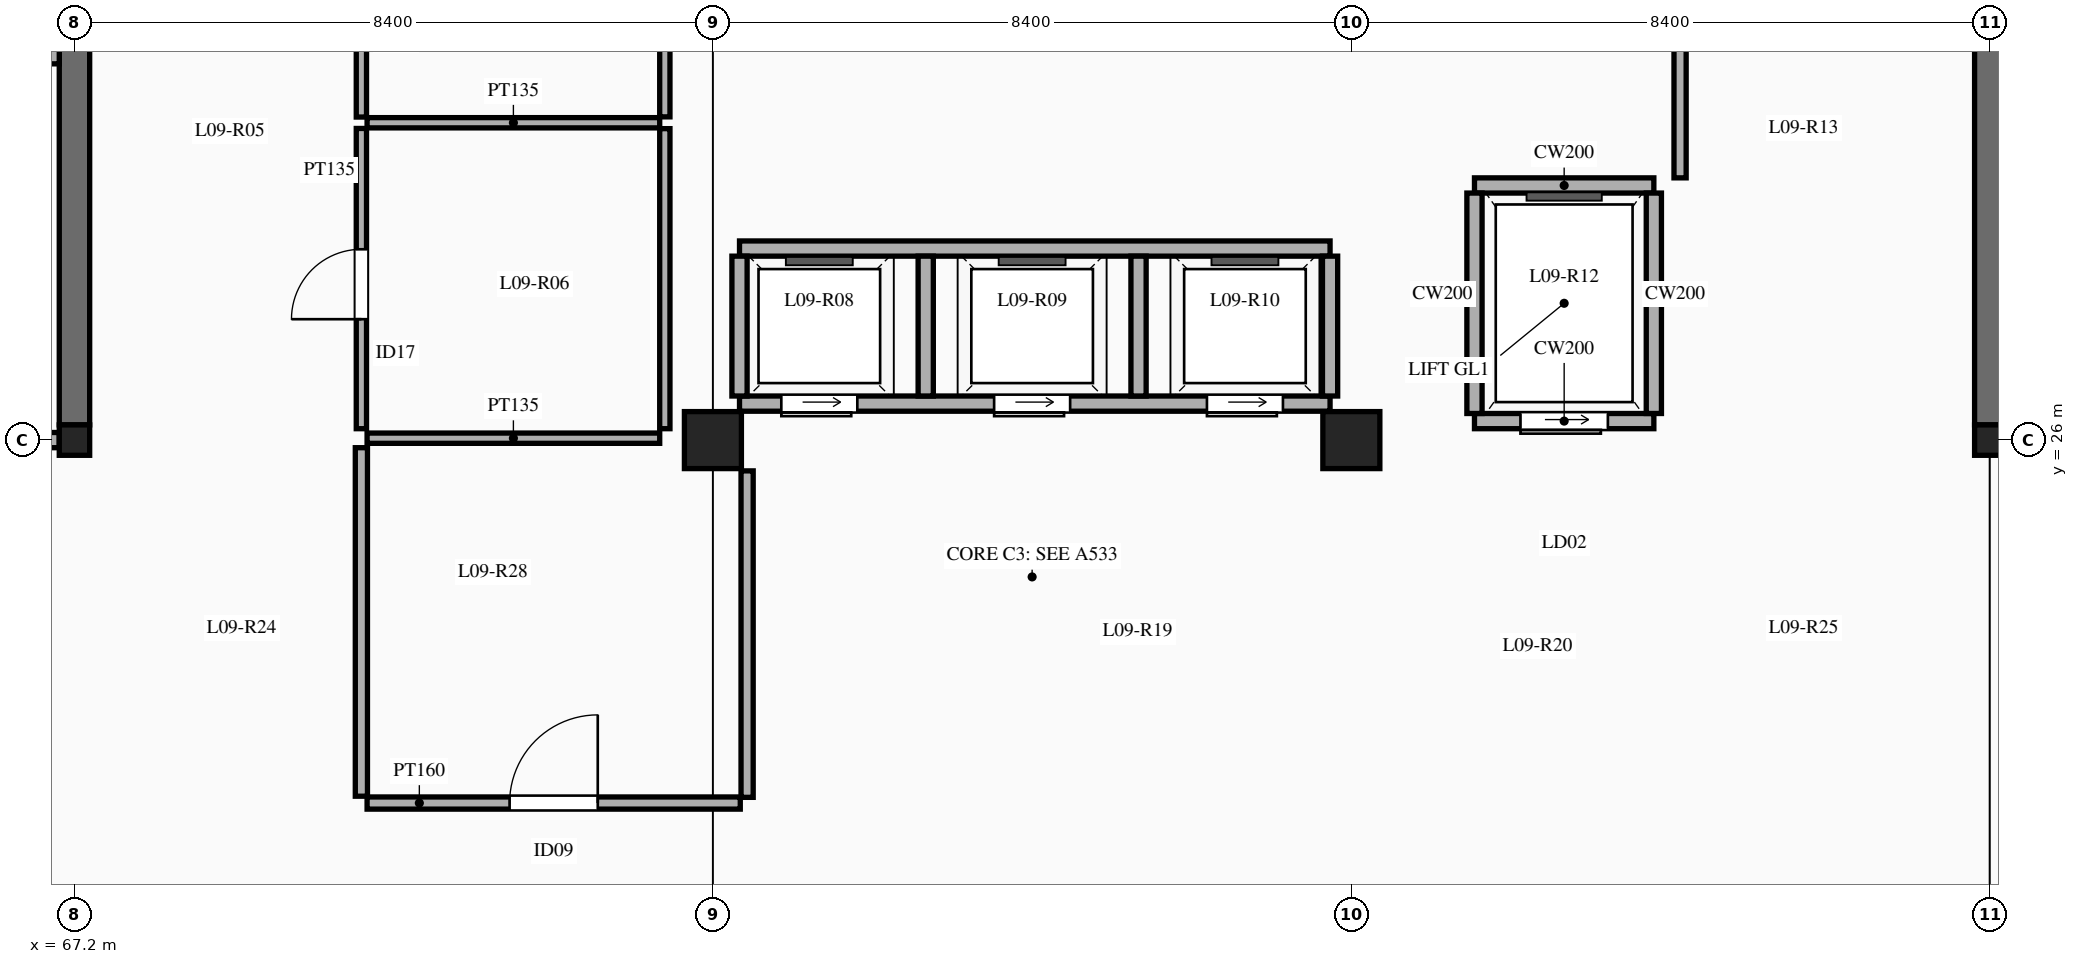
"""IFC4 building model, lengths in metres.
Left out: names, types, materials, properties, quantities, classifications, styles, units other than length and angle.
Written with IfcOpenShell. Run it as: python <this file> out.ifc"""

import sys

from ifc_helpers import new_model, si_unit, direction, frame, frame_2d, origin, origin_2d, place, context, subcontext, project, spatial, rectangle, extrude, element, fill, save


model = new_model("IFC4")
c1 = context("Model", 3, precision=1e-05, world=origin(), true_north=direction((0.0, 1.0)))
c2 = subcontext(c1, "Body", "Model", "MODEL_VIEW")
j1 = project(units=[si_unit("LENGTHUNIT", "METRE"), si_unit("PLANEANGLEUNIT", "RADIAN")], contexts=[c1])
p1 = place(None, origin())
s1 = spatial("IfcSite", under=j1, at=p1, CompositionType="ELEMENT")
p2 = place(p1, origin())
s2 = spatial("IfcBuilding", under=s1, at=p2, CompositionType="ELEMENT")
p3 = place(p2, frame((0.0, 0.0, 42.0)))
s3 = spatial("IfcBuildingStorey", under=s2, at=p3, CompositionType="ELEMENT", Elevation=42.0)
p4 = place(p3, frame((67.2, 26.0, 0.0), z_axis=(0.0, 0.0, 1.0), x_axis=(1.0, 0.0, 0.0)))
e1 = element("IfcColumn", 1, at=p4, inside=s3, PredefinedType="COLUMN", context=c2, shape_type="SweptSolid", body=[
    extrude(rectangle(XDim=0.4, YDim=0.4, at=origin_2d()), origin(), (0.0, 0.0, 1.0), 4.5),
])
for number, where, z_axis, x_axis in (
    (2, (75.6, 26.0, 0.0), (0.0, 0.0, 1.0), (1.0, 0.0, 0.0)),
    (3, (84.0, 26.0, 0.0), (0.0, 0.0, 1.0), (1.0, 0.0, 0.0)),
):
    element("IfcColumn", number, at=place(p3, frame(where, z_axis=z_axis, x_axis=x_axis)), inside=s3, PredefinedType="COLUMN", context=c2, shape_type="SweptSolid", body=[
        extrude(rectangle(XDim=0.75, YDim=0.75, at=origin_2d()), origin(), (0.0, 0.0, 1.0), 4.5),
    ])
p5 = place(p3, frame((92.4, 26.0, 0.0), z_axis=(0.0, 0.0, 1.0), x_axis=(1.0, 0.0, 0.0)))
e4 = element("IfcColumn", 4, at=p5, inside=s3, PredefinedType="COLUMN", context=c2, shape_type="SweptSolid", body=[
    extrude(rectangle(XDim=0.4, YDim=0.4, at=origin_2d()), origin(), (0.0, 0.0, 1.0), 4.5),
])
for number, where, z_axis, x_axis in (
    (5, (67.2, 26.2, 0.0), (0.0, 0.0, 1.0), (0.0, 1.0, 0.0)),
    (6, (92.4, 26.2, 0.0), (0.0, 0.0, 1.0), (0.0, 1.0, 0.0)),
):
    element("IfcWall", number, at=place(p3, frame(where, z_axis=z_axis, x_axis=x_axis)), inside=s3, PredefinedType="SHEAR", context=c2, shape_type="SweptSolid", body=[
        extrude(rectangle(XDim=8.0, YDim=0.4, at=frame_2d((4.0, 0.0))), origin(), (0.0, 0.0, 1.0), 4.5),
    ])
p6 = place(p3, frame((59.0, 26.0, 0.0), z_axis=(0.0, 0.0, 1.0), x_axis=(1.0, 0.0, 0.0)))
e7 = element("IfcWall", 7, at=p6, inside=s3, PredefinedType="SOLIDWALL", context=c2, shape_type="SweptSolid", body=[
    extrude(rectangle(XDim=8.0, YDim=0.2, at=frame_2d((4.0, 0.0))), origin(), (0.0, 0.0, 1.0), 3.78),
])
p7 = place(p6, frame((1.55, 0.0, 0.0)))
e8 = element("IfcOpeningElement", 8, at=p7, cuts=e7, PredefinedType="OPENING", context=c2, shape_type="SweptSolid", body=[
    extrude(rectangle(XDim=1.15, YDim=2.15, at=frame_2d((0.575, 1.075))), frame((0.0, 0.11, 0.0), z_axis=(0.0, -1.0, 0.0), x_axis=(1.0, 0.0, 0.0)), (0.0, 0.0, 1.0), 0.22),
])
p8 = place(p6, frame((5.35, 0.0, 0.0)))
e9 = element("IfcOpeningElement", 9, at=p8, cuts=e7, PredefinedType="OPENING", context=c2, shape_type="SweptSolid", body=[
    extrude(rectangle(XDim=1.22, YDim=2.15, at=frame_2d((0.61, 1.075))), frame((0.0, 0.11, 0.0), z_axis=(0.0, -1.0, 0.0), x_axis=(1.0, 0.0, 0.0)), (0.0, 0.0, 1.0), 0.22),
])
p9 = place(p3, frame((63.05, 31.05, 0.0), z_axis=(0.0, 0.0, 1.0), x_axis=(1.0, 0.0, 0.0)))
e10 = element("IfcWall", 10, at=p9, inside=s3, PredefinedType="SOLIDWALL", context=c2, shape_type="SweptSolid", body=[
    extrude(rectangle(XDim=3.95, YDim=0.2, at=frame_2d((1.975, 0.0))), origin(), (0.0, 0.0, 1.0), 4.3),
])
p10 = place(p9, frame((1.4, 0.0, 0.0)))
e11 = element("IfcOpeningElement", 11, at=p10, cuts=e10, PredefinedType="OPENING", context=c2, shape_type="SweptSolid", body=[
    extrude(rectangle(XDim=1.1, YDim=2.15, at=frame_2d((0.55, 1.075))), frame((0.0, 0.11, 0.0), z_axis=(0.0, -1.0, 0.0), x_axis=(1.0, 0.0, 0.0)), (0.0, 0.0, 1.0), 0.22),
])
p11 = place(p3, frame((75.95, 26.48, 0.0), z_axis=(0.0, 0.0, 1.0), x_axis=(1.0, 0.0, 0.0)))
e12 = element("IfcWall", 12, at=p11, inside=s3, PredefinedType="SOLIDWALL", context=c2, shape_type="SweptSolid", body=[
    extrude(rectangle(XDim=7.77, YDim=0.2, at=frame_2d((3.885, 0.0))), origin(), (0.0, 0.0, 1.0), 4.3),
])
p12 = place(p11, frame((0.55, 0.0, 0.0)))
e13 = element("IfcOpeningElement", 13, at=p12, cuts=e12, PredefinedType="OPENING", context=c2, shape_type="SweptSolid", body=[
    extrude(rectangle(XDim=1.0, YDim=2.15, at=frame_2d((0.5, 1.075))), frame((0.0, 0.11, 0.0), z_axis=(0.0, -1.0, 0.0), x_axis=(1.0, 0.0, 0.0)), (0.0, 0.0, 1.0), 0.22),
])
p13 = place(p11, frame((3.35, 0.0, 0.0)))
e14 = element("IfcOpeningElement", 14, at=p13, cuts=e12, PredefinedType="OPENING", context=c2, shape_type="SweptSolid", body=[
    extrude(rectangle(XDim=1.0, YDim=2.15, at=frame_2d((0.5, 1.075))), frame((0.0, 0.11, 0.0), z_axis=(0.0, -1.0, 0.0), x_axis=(1.0, 0.0, 0.0)), (0.0, 0.0, 1.0), 0.22),
])
p14 = place(p11, frame((6.15, 0.0, 0.0)))
e15 = element("IfcOpeningElement", 15, at=p14, cuts=e12, PredefinedType="OPENING", context=c2, shape_type="SweptSolid", body=[
    extrude(rectangle(XDim=1.0, YDim=2.15, at=frame_2d((0.5, 1.075))), frame((0.0, 0.11, 0.0), z_axis=(0.0, -1.0, 0.0), x_axis=(1.0, 0.0, 0.0)), (0.0, 0.0, 1.0), 0.22),
])
p15 = place(p3, frame((75.95, 28.52, 0.0), z_axis=(0.0, 0.0, 1.0), x_axis=(1.0, 0.0, 0.0)))
e16 = element("IfcWall", 16, at=p15, inside=s3, PredefinedType="SOLIDWALL", context=c2, shape_type="SweptSolid", body=[
    extrude(rectangle(XDim=7.77, YDim=0.2, at=frame_2d((3.885, 0.0))), origin(), (0.0, 0.0, 1.0), 4.3),
])
p16 = place(p3, frame((75.95, 26.58, 0.0), z_axis=(0.0, 0.0, 1.0), x_axis=(0.0, 1.0, 0.0)))
e17 = element("IfcWall", 17, at=p16, inside=s3, PredefinedType="SOLIDWALL", context=c2, shape_type="SweptSolid", body=[
    extrude(rectangle(XDim=1.84, YDim=0.2, at=frame_2d((0.92, 0.0))), origin(), (0.0, 0.0, 1.0), 3.83),
])
for number, where, z_axis, x_axis in (
    (18, (78.4, 26.58, 0.0), (0.0, 0.0, 1.0), (0.0, 1.0, 0.0)),
    (19, (81.2, 26.58, 0.0), (0.0, 0.0, 1.0), (0.0, 1.0, 0.0)),
):
    element("IfcWall", number, at=place(p3, frame(where, z_axis=z_axis, x_axis=x_axis)), inside=s3, PredefinedType="SOLIDWALL", context=c2, shape_type="SweptSolid", body=[
        extrude(rectangle(XDim=1.84, YDim=0.2, at=frame_2d((0.92, 0.0))), origin(), (0.0, 0.0, 1.0), 4.3),
    ])
p17 = place(p3, frame((83.72, 26.58, 0.0), z_axis=(0.0, 0.0, 1.0), x_axis=(0.0, 1.0, 0.0)))
e20 = element("IfcWall", 20, at=p17, inside=s3, PredefinedType="SOLIDWALL", context=c2, shape_type="SweptSolid", body=[
    extrude(rectangle(XDim=1.84, YDim=0.2, at=frame_2d((0.92, 0.0))), origin(), (0.0, 0.0, 1.0), 3.83),
])
p18 = place(p3, frame((85.62, 26.25, 0.0), z_axis=(0.0, 0.0, 1.0), x_axis=(1.0, 0.0, 0.0)))
e21 = element("IfcWall", 21, at=p18, inside=s3, PredefinedType="SOLIDWALL", context=c2, shape_type="SweptSolid", body=[
    extrude(rectangle(XDim=2.36, YDim=0.2, at=frame_2d((1.18, 0.0))), origin(), (0.0, 0.0, 1.0), 3.78),
])
p19 = place(p18, frame((0.605, 0.0, 0.0)))
e22 = element("IfcOpeningElement", 22, at=p19, cuts=e21, PredefinedType="OPENING", context=c2, shape_type="SweptSolid", body=[
    extrude(rectangle(XDim=1.15, YDim=2.2, at=frame_2d((0.575, 1.1))), frame((0.0, 0.11, 0.0), z_axis=(0.0, -1.0, 0.0), x_axis=(1.0, 0.0, 0.0)), (0.0, 0.0, 1.0), 0.22),
])
p20 = place(p3, frame((85.62, 29.35, 0.0), z_axis=(0.0, 0.0, 1.0), x_axis=(1.0, 0.0, 0.0)))
e23 = element("IfcWall", 23, at=p20, inside=s3, PredefinedType="SOLIDWALL", context=c2, shape_type="SweptSolid", body=[
    extrude(rectangle(XDim=2.36, YDim=0.2, at=frame_2d((1.18, 0.0))), origin(), (0.0, 0.0, 1.0), 4.3),
])
p21 = place(p3, frame((85.62, 26.35, 0.0), z_axis=(0.0, 0.0, 1.0), x_axis=(0.0, 1.0, 0.0)))
e24 = element("IfcWall", 24, at=p21, inside=s3, PredefinedType="SOLIDWALL", context=c2, shape_type="SweptSolid", body=[
    extrude(rectangle(XDim=2.9, YDim=0.2, at=frame_2d((1.45, 0.0))), origin(), (0.0, 0.0, 1.0), 4.3),
])
p22 = place(p3, frame((87.98, 26.35, 0.0), z_axis=(0.0, 0.0, 1.0), x_axis=(0.0, 1.0, 0.0)))
e25 = element("IfcWall", 25, at=p22, inside=s3, PredefinedType="SOLIDWALL", context=c2, shape_type="SweptSolid", body=[
    extrude(rectangle(XDim=2.9, YDim=0.2, at=frame_2d((1.45, 0.0))), origin(), (0.0, 0.0, 1.0), 4.03),
])
p23 = place(p3, frame((70.975, 26.15, 0.0), z_axis=(0.0, 0.0, 1.0), x_axis=(0.0, 1.0, 0.0)))
e26 = element("IfcWall", 26, at=p23, inside=s3, PredefinedType="PARTITIONING", context=c2, shape_type="SweptSolid", body=[
    extrude(rectangle(XDim=3.95, YDim=0.135, at=frame_2d((1.975, 0.0))), origin(), (0.0, 0.0, 1.0), 3.45),
])
p24 = place(p23, frame((1.441, 0.0, 0.0)))
e27 = element("IfcOpeningElement", 27, at=p24, cuts=e26, PredefinedType="OPENING", context=c2, shape_type="SweptSolid", body=[
    extrude(rectangle(XDim=0.92, YDim=2.12, at=frame_2d((0.46, 1.06))), frame((0.0, 0.077, 0.0), z_axis=(0.0, -1.0, 0.0), x_axis=(1.0, 0.0, 0.0)), (0.0, 0.0, 1.0), 0.155),
])
p25 = place(p3, frame((70.975, 30.25, 0.0), z_axis=(0.0, 0.0, 1.0), x_axis=(0.0, 1.0, 0.0)))
e28 = element("IfcWall", 28, at=p25, inside=s3, PredefinedType="PARTITIONING", context=c2, shape_type="SweptSolid", body=[
    extrude(rectangle(XDim=3.9, YDim=0.135, at=frame_2d((1.95, 0.0))), origin(), (0.0, 0.0, 1.0), 3.45),
])
p26 = place(p25, frame((1.46, 0.0, 0.0)))
e29 = element("IfcOpeningElement", 29, at=p26, cuts=e28, PredefinedType="OPENING", context=c2, shape_type="SweptSolid", body=[
    extrude(rectangle(XDim=0.98, YDim=2.15, at=frame_2d((0.49, 1.075))), frame((0.0, 0.077, 0.0), z_axis=(0.0, -1.0, 0.0), x_axis=(1.0, 0.0, 0.0)), (0.0, 0.0, 1.0), 0.155),
])
for number, where, z_axis, x_axis in (
    (30, (71.05, 30.175, 0.0), (0.0, 0.0, 1.0), (1.0, 0.0, 0.0)),
    (31, (71.05, 26.025, 0.0), (0.0, 0.0, 1.0), (1.0, 0.0, 0.0)),
):
    element("IfcWall", number, at=place(p3, frame(where, z_axis=z_axis, x_axis=x_axis)), inside=s3, PredefinedType="PARTITIONING", context=c2, shape_type="SweptSolid", body=[
        extrude(rectangle(XDim=3.85, YDim=0.135, at=frame_2d((1.925, 0.0))), origin(), (0.0, 0.0, 1.0), 3.45),
    ])
p27 = place(p3, frame((88.325, 29.45, 0.0), z_axis=(0.0, 0.0, 1.0), x_axis=(0.0, 1.0, 0.0)))
e32 = element("IfcWall", 32, at=p27, inside=s3, PredefinedType="PARTITIONING", context=c2, shape_type="SweptSolid", body=[
    extrude(rectangle(XDim=4.7, YDim=0.16, at=frame_2d((2.35, 0.0))), origin(), (0.0, 0.0, 1.0), 3.45),
])
p28 = place(p3, frame((76.05, 21.3, 0.0), z_axis=(0.0, 0.0, 1.0), x_axis=(0.0, 1.0, 0.0)))
e33 = element("IfcWall", 33, at=p28, inside=s3, PredefinedType="PARTITIONING", context=c2, shape_type="SweptSolid", body=[
    extrude(rectangle(XDim=4.295, YDim=0.16, at=frame_2d((2.147, 0.0))), origin(), (0.0, 0.0, 1.0), 3.45),
])
p29 = place(p3, frame((71.05, 21.225, 0.0), z_axis=(0.0, 0.0, 1.0), x_axis=(1.0, 0.0, 0.0)))
e34 = element("IfcWall", 34, at=p29, inside=s3, PredefinedType="PARTITIONING", context=c2, shape_type="SweptSolid", body=[
    extrude(rectangle(XDim=4.91, YDim=0.16, at=frame_2d((2.455, 0.0))), origin(), (0.0, 0.0, 1.0), 3.45),
])
p30 = place(p29, frame((1.875, 0.0, 0.0)))
e35 = element("IfcOpeningElement", 35, at=p30, cuts=e34, PredefinedType="OPENING", context=c2, shape_type="SweptSolid", body=[
    extrude(rectangle(XDim=1.16, YDim=2.2, at=frame_2d((0.58, 1.1))), frame((0.0, 0.09, 0.0), z_axis=(0.0, -1.0, 0.0), x_axis=(1.0, 0.0, 0.0)), (0.0, 0.0, 1.0), 0.18),
])
p31 = place(p3, frame((70.975, 21.315, 0.0), z_axis=(0.0, 0.0, 1.0), x_axis=(0.0, 1.0, 0.0)))
e36 = element("IfcWall", 36, at=p31, inside=s3, PredefinedType="PARTITIONING", context=c2, shape_type="SweptSolid", body=[
    extrude(rectangle(XDim=4.585, YDim=0.16, at=frame_2d((2.292, 0.0))), origin(), (0.0, 0.0, 1.0), 3.45),
])
p32 = place(p3, frame((74.968, 26.15, 0.0), z_axis=(0.0, 0.0, 1.0), x_axis=(0.0, 1.0, 0.0)))
e37 = element("IfcWall", 37, at=p32, inside=s3, PredefinedType="PARTITIONING", context=c2, shape_type="SweptSolid", body=[
    extrude(rectangle(XDim=3.948, YDim=0.135, at=frame_2d((1.974, 0.0))), origin(), (0.0, 0.0, 1.0), 3.45),
])
p33 = place(p3, frame((74.968, 30.252, 0.0), z_axis=(0.0, 0.0, 1.0), x_axis=(0.0, 1.0, 0.0)))
e38 = element("IfcWall", 38, at=p33, inside=s3, PredefinedType="PARTITIONING", context=c2, shape_type="SweptSolid", body=[
    extrude(rectangle(XDim=3.895, YDim=0.135, at=frame_2d((1.948, 0.0))), origin(), (0.0, 0.0, 1.0), 3.45),
])
p34 = place(p12, frame((1.0, 0.0, 0.0), z_axis=(0.0, 0.0, 1.0), x_axis=(-1.0, 0.0, 0.0)))
e39 = element("IfcDoor", 39, at=p34, inside=s3, OperationType="SLIDING_TO_LEFT", PredefinedType="DOOR", context=c2, shape_type="SweptSolid", body=[
    extrude(rectangle(XDim=1.0, YDim=2.15, at=frame_2d((0.5, 1.075))), frame((0.0, 0.025, 0.0), z_axis=(0.0, -1.0, 0.0), x_axis=(1.0, 0.0, 0.0)), (0.0, 0.0, 1.0), 0.05),
])
fill(e13, e39)
p35 = place(p13, frame((1.0, 0.0, 0.0), z_axis=(0.0, 0.0, 1.0), x_axis=(-1.0, 0.0, 0.0)))
e40 = element("IfcDoor", 40, at=p35, inside=s3, OperationType="SLIDING_TO_LEFT", PredefinedType="DOOR", context=c2, shape_type="SweptSolid", body=[
    extrude(rectangle(XDim=1.0, YDim=2.15, at=frame_2d((0.5, 1.075))), frame((0.0, 0.025, 0.0), z_axis=(0.0, -1.0, 0.0), x_axis=(1.0, 0.0, 0.0)), (0.0, 0.0, 1.0), 0.05),
])
fill(e14, e40)
p36 = place(p14, frame((1.0, 0.0, 0.0), z_axis=(0.0, 0.0, 1.0), x_axis=(-1.0, 0.0, 0.0)))
e41 = element("IfcDoor", 41, at=p36, inside=s3, OperationType="SLIDING_TO_LEFT", PredefinedType="DOOR", context=c2, shape_type="SweptSolid", body=[
    extrude(rectangle(XDim=1.0, YDim=2.15, at=frame_2d((0.5, 1.075))), frame((0.0, 0.025, 0.0), z_axis=(0.0, -1.0, 0.0), x_axis=(1.0, 0.0, 0.0)), (0.0, 0.0, 1.0), 0.05),
])
fill(e15, e41)
p37 = place(p19, frame((1.15, 0.0, 0.0), z_axis=(0.0, 0.0, 1.0), x_axis=(-1.0, 0.0, 0.0)))
e42 = element("IfcDoor", 42, at=p37, inside=s3, OperationType="SLIDING_TO_LEFT", PredefinedType="DOOR", context=c2, shape_type="SweptSolid", body=[
    extrude(rectangle(XDim=1.15, YDim=2.2, at=frame_2d((0.575, 1.1))), frame((0.0, 0.025, 0.0), z_axis=(0.0, -1.0, 0.0), x_axis=(1.0, 0.0, 0.0)), (0.0, 0.0, 1.0), 0.05),
])
fill(e22, e42)
p38 = place(p24, origin())
e43 = element("IfcDoor", 43, at=p38, inside=s3, OperationType="SINGLE_SWING_LEFT", PredefinedType="DOOR", context=c2, shape_type="SweptSolid", body=[
    extrude(rectangle(XDim=0.92, YDim=2.12, at=frame_2d((0.46, 1.06))), frame((0.0, 0.025, 0.0), z_axis=(0.0, -1.0, 0.0), x_axis=(1.0, 0.0, 0.0)), (0.0, 0.0, 1.0), 0.05),
])
fill(e27, e43)
p39 = place(p30, origin())
e44 = element("IfcDoor", 44, at=p39, inside=s3, OperationType="SINGLE_SWING_RIGHT", PredefinedType="DOOR", context=c2, shape_type="SweptSolid", body=[
    extrude(rectangle(XDim=1.16, YDim=2.2, at=frame_2d((0.58, 1.1))), frame((0.0, 0.025, 0.0), z_axis=(0.0, -1.0, 0.0), x_axis=(1.0, 0.0, 0.0)), (0.0, 0.0, 1.0), 0.05),
])
fill(e35, e44)
save(model, sys.argv[1])
